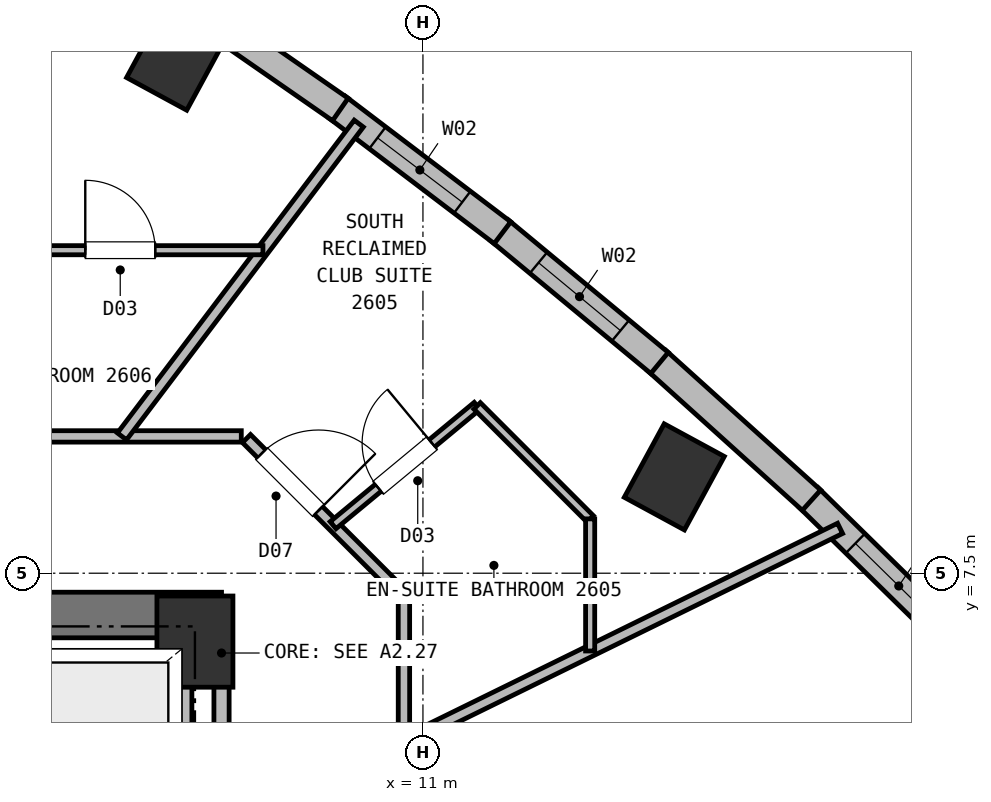
"""IFC4 building model, lengths in metres.
Left out: names, types, materials, properties, quantities, classifications, styles, units other than length and angle.
Written with IfcOpenShell. Run it as: python <this file> out.ifc"""

import sys

from ifc_helpers import new_model, si_unit, direction, frame, frame_2d, origin, origin_2d, place, context, subcontext, project, spatial, rectangle, extrude, element, fill, save


model = new_model("IFC4")
c1 = context("Model", 3, precision=1e-05, world=origin(), true_north=direction((0.0, 1.0)))
c2 = subcontext(c1, "Body", "Model", "MODEL_VIEW")
j1 = project(units=[si_unit("LENGTHUNIT", "METRE"), si_unit("PLANEANGLEUNIT", "RADIAN")], contexts=[c1])
p1 = place(None, origin())
s1 = spatial("IfcSite", under=j1, at=p1, CompositionType="ELEMENT")
p2 = place(p1, origin())
s2 = spatial("IfcBuilding", under=s1, at=p2, CompositionType="ELEMENT")
p3 = place(p2, frame((0.0, 0.0, 97.25)))
s3 = spatial("IfcBuildingStorey", under=s2, at=p3, CompositionType="ELEMENT", Elevation=97.25)
p4 = place(p3, frame((8.0, 6.6, 0.0), z_axis=(0.0, 0.0, 1.0), x_axis=(1.0, 0.0, 0.0)))
e1 = element("IfcColumn", 1, at=p4, inside=s3, PredefinedType="COLUMN", context=c2, shape_type="SweptSolid", body=[
    extrude(rectangle(XDim=1.0, YDim=1.2, at=origin_2d()), origin(), (0.0, 0.0, 1.0), 3.75),
])
p5 = place(p3, frame((-8.35, 6.95, 0.0), z_axis=(0.0, 0.0, 1.0), x_axis=(1.0, 0.0, 0.0)))
e2 = element("IfcWall", 2, at=p5, inside=s3, PredefinedType="SHEAR", context=c2, shape_type="SweptSolid", body=[
    extrude(rectangle(XDim=16.7, YDim=0.6, at=frame_2d((8.35, 0.0))), origin(), (0.0, 0.0, 1.0), 3.5),
])
for number, where, z_axis, x_axis in (
    (3, (14.307, 8.767, 0.0), (0.0, 0.0, 1.0), (-0.879, 0.477, 0.0)),
    (4, (7.759, 14.29, 0.0), (0.0, 0.0, 1.0), (-0.879, 0.477, 0.0)),
):
    element("IfcColumn", number, at=place(p3, frame(where, z_axis=z_axis, x_axis=x_axis)), inside=s3, PredefinedType="COLUMN", context=c2, shape_type="SweptSolid", body=[
        extrude(rectangle(XDim=0.9, YDim=1.1, at=origin_2d()), origin(), (0.0, 0.0, 1.0), 3.75),
    ])
p6 = place(p3, frame((16.075, 8.495, 0.0), z_axis=(0.0, 0.0, 1.0), x_axis=(0.713713584755, -0.70043766242, 0.0)))
e5 = element("IfcWall", 5, at=p6, inside=s3, PredefinedType="SOLIDWALL", context=c2, shape_type="SweptSolid", body=[
    extrude(rectangle(XDim=2.759, YDim=0.36, at=frame_2d((1.379, 0.0))), origin(), (0.0, 0.0, 1.0), 3.5),
])
p7 = place(p6, frame((0.86, 0.0, 0.72)))
e6 = element("IfcOpeningElement", 6, at=p7, cuts=e5, PredefinedType="OPENING", context=c2, shape_type="SweptSolid", body=[
    extrude(rectangle(XDim=1.6, YDim=1.88, at=frame_2d((0.8, 0.94))), frame((0.0, 0.19, 0.0), z_axis=(0.0, -1.0, 0.0), x_axis=(1.0, 0.0, 0.0)), (0.0, 0.0, 1.0), 0.38),
])
p8 = place(p3, frame((14.075, 10.299, 0.0), z_axis=(0.0, 0.0, 1.0), x_axis=(0.742346706701, -0.67001594537, 0.0)))
e7 = element("IfcWall", 7, at=p8, inside=s3, PredefinedType="SOLIDWALL", context=c2, shape_type="SweptSolid", body=[
    extrude(rectangle(XDim=2.744, YDim=0.36, at=frame_2d((1.372, 0.0))), origin(), (0.0, 0.0, 1.0), 3.5),
])
p9 = place(p3, frame((12.007, 12.011, 0.0), z_axis=(0.0, 0.0, 1.0), x_axis=(0.769960149578, -0.63809197461, 0.0)))
e8 = element("IfcWall", 8, at=p9, inside=s3, PredefinedType="SOLIDWALL", context=c2, shape_type="SweptSolid", body=[
    extrude(rectangle(XDim=2.735, YDim=0.36, at=frame_2d((1.367, 0.0))), origin(), (0.0, 0.0, 1.0), 3.5),
])
p10 = place(p9, frame((0.667, 0.0, 0.72)))
e9 = element("IfcOpeningElement", 9, at=p10, cuts=e8, PredefinedType="OPENING", context=c2, shape_type="SweptSolid", body=[
    extrude(rectangle(XDim=1.4, YDim=1.84, at=frame_2d((0.7, 0.92))), frame((0.0, 0.19, 0.0), z_axis=(0.0, -1.0, 0.0), x_axis=(1.0, 0.0, 0.0)), (0.0, 0.0, 1.0), 0.38),
])
p11 = place(p3, frame((9.873, 13.631, 0.0), z_axis=(0.0, 0.0, 1.0), x_axis=(0.796336225349, -0.604854210696, 0.0)))
e10 = element("IfcWall", 10, at=p11, inside=s3, PredefinedType="SOLIDWALL", context=c2, shape_type="SweptSolid", body=[
    extrude(rectangle(XDim=2.73, YDim=0.36, at=frame_2d((1.365, 0.0))), origin(), (0.0, 0.0, 1.0), 3.5),
])
p12 = place(p11, frame((0.665, 0.0, 0.72)))
e11 = element("IfcOpeningElement", 11, at=p12, cuts=e10, PredefinedType="OPENING", context=c2, shape_type="SweptSolid", body=[
    extrude(rectangle(XDim=1.4, YDim=1.84, at=frame_2d((0.7, 0.92))), frame((0.0, 0.19, 0.0), z_axis=(0.0, -1.0, 0.0), x_axis=(1.0, 0.0, 0.0)), (0.0, 0.0, 1.0), 0.38),
])
p13 = place(p3, frame((7.671, 15.159, 0.0), z_axis=(0.0, 0.0, 1.0), x_axis=(0.821331552378, -0.570451120665, 0.0)))
e12 = element("IfcWall", 12, at=p13, inside=s3, PredefinedType="SOLIDWALL", context=c2, shape_type="SweptSolid", body=[
    extrude(rectangle(XDim=2.73, YDim=0.36, at=frame_2d((1.365, 0.0))), origin(), (0.0, 0.0, 1.0), 3.5),
])
p14 = place(p3, frame((7.85, 4.57, 0.0), z_axis=(0.0, 0.0, 1.0), x_axis=(0.0, 1.0, 0.0)))
e13 = element("IfcWall", 13, at=p14, inside=s3, PredefinedType="PARTITIONING", context=c2, shape_type="SweptSolid", body=[
    extrude(rectangle(XDim=2.08, YDim=0.22, at=frame_2d((1.04, 0.0))), origin(), (0.0, 0.0, 1.0), 3.12),
])
p15 = place(p3, frame((8.35, 1.25, 0.0), z_axis=(0.0, 0.0, 1.0), x_axis=(0.0, 1.0, 0.0)))
e14 = element("IfcWall", 14, at=p15, inside=s3, PredefinedType="PARTITIONING", context=c2, shape_type="SweptSolid", body=[
    extrude(rectangle(XDim=5.3, YDim=0.2, at=frame_2d((2.65, 0.0))), origin(), (0.0, 0.0, 1.0), 3.5),
])
p16 = place(p15, frame((0.95, 0.0, 0.0)))
e15 = element("IfcOpeningElement", 15, at=p16, cuts=e14, PredefinedType="OPENING", context=c2, shape_type="SweptSolid", body=[
    extrude(rectangle(XDim=1.15, YDim=2.15, at=frame_2d((0.575, 1.075))), frame((0.0, 0.11, 0.0), z_axis=(0.0, -1.0, 0.0), x_axis=(1.0, 0.0, 0.0)), (0.0, 0.0, 1.0), 0.22),
])
p17 = place(p3, frame((10.75, 7.16, 0.0), z_axis=(0.0, 0.0, 1.0), x_axis=(0.0, -1.0, 0.0)))
e16 = element("IfcWall", 16, at=p17, inside=s3, PredefinedType="PARTITIONING", context=c2, shape_type="SweptSolid", body=[
    extrude(rectangle(XDim=12.92, YDim=0.15, at=frame_2d((6.46, 0.0))), origin(), (0.0, 0.0, 1.0), 3.5),
])
p18 = place(p17, frame((2.937, 0.0, 0.0)))
e17 = element("IfcOpeningElement", 17, at=p18, cuts=e16, PredefinedType="OPENING", context=c2, shape_type="SweptSolid", body=[
    extrude(rectangle(XDim=1.0, YDim=2.15, at=frame_2d((0.5, 1.075))), frame((0.0, 0.085, 0.0), z_axis=(0.0, -1.0, 0.0), x_axis=(1.0, 0.0, 0.0)), (0.0, 0.0, 1.0), 0.17),
])
p19 = place(p17, frame((8.03, 0.0, 0.0)))
e18 = element("IfcOpeningElement", 18, at=p19, cuts=e16, PredefinedType="OPENING", context=c2, shape_type="SweptSolid", body=[
    extrude(rectangle(XDim=1.06, YDim=2.15, at=frame_2d((0.53, 1.075))), frame((0.0, 0.085, 0.0), z_axis=(0.0, -1.0, 0.0), x_axis=(1.0, 0.0, 0.0)), (0.0, 0.0, 1.0), 0.17),
])
p20 = place(p3, frame((8.678, 9.272, 0.0), z_axis=(0.0, 0.0, 1.0), x_axis=(0.707106781187, -0.707106781187, 0.0)))
e19 = element("IfcWall", 19, at=p20, inside=s3, PredefinedType="PARTITIONING", context=c2, shape_type="SweptSolid", body=[
    extrude(rectangle(XDim=2.89, YDim=0.15, at=frame_2d((1.445, 0.0))), origin(), (0.0, 0.0, 1.0), 3.5),
])
p21 = place(p20, frame((0.28, 0.0, 0.0)))
e20 = element("IfcOpeningElement", 20, at=p21, cuts=e19, PredefinedType="OPENING", context=c2, shape_type="SweptSolid", body=[
    extrude(rectangle(XDim=1.06, YDim=2.15, at=frame_2d((0.53, 1.075))), frame((0.0, 0.085, 0.0), z_axis=(0.0, -1.0, 0.0), x_axis=(1.0, 0.0, 0.0)), (0.0, 0.0, 1.0), 0.17),
])
p22 = place(p3, frame((-8.61, 9.3, 0.0), z_axis=(0.0, 0.0, 1.0), x_axis=(1.0, 0.0, 0.0)))
e21 = element("IfcWall", 21, at=p22, inside=s3, PredefinedType="PARTITIONING", context=c2, shape_type="SweptSolid", body=[
    extrude(rectangle(XDim=17.22, YDim=0.15, at=frame_2d((8.61, 0.0))), origin(), (0.0, 0.0, 1.0), 3.5),
])
p23 = place(p22, frame((11.167, 0.0, 0.0)))
e22 = element("IfcOpeningElement", 22, at=p23, cuts=e21, PredefinedType="OPENING", context=c2, shape_type="SweptSolid", body=[
    extrude(rectangle(XDim=1.0, YDim=2.15, at=frame_2d((0.5, 1.075))), frame((0.0, 0.085, 0.0), z_axis=(0.0, -1.0, 0.0), x_axis=(1.0, 0.0, 0.0)), (0.0, 0.0, 1.0), 0.17),
])
p24 = place(p22, frame((6.944, 0.0, 0.0)))
e23 = element("IfcOpeningElement", 23, at=p24, cuts=e21, PredefinedType="OPENING", context=c2, shape_type="SweptSolid", body=[
    extrude(rectangle(XDim=1.06, YDim=2.15, at=frame_2d((0.53, 1.075))), frame((0.0, 0.085, 0.0), z_axis=(0.0, -1.0, 0.0), x_axis=(1.0, 0.0, 0.0)), (0.0, 0.0, 1.0), 0.17),
])
p25 = place(p22, frame((2.311, 0.0, 0.0)))
e24 = element("IfcOpeningElement", 24, at=p25, cuts=e21, PredefinedType="OPENING", context=c2, shape_type="SweptSolid", body=[
    extrude(rectangle(XDim=1.06, YDim=2.15, at=frame_2d((0.53, 1.075))), frame((0.0, 0.085, 0.0), z_axis=(0.0, -1.0, 0.0), x_axis=(1.0, 0.0, 0.0)), (0.0, 0.0, 1.0), 0.17),
])
p26 = place(p3, frame((10.75, 5.274, 0.0), z_axis=(0.0, 0.0, 1.0), x_axis=(0.897755780575, 0.440493539616, 0.0)))
e25 = element("IfcWall", 25, at=p26, inside=s3, PredefinedType="PARTITIONING", context=c2, shape_type="SweptSolid", body=[
    extrude(rectangle(XDim=6.392, YDim=0.15, at=frame_2d((3.196, 0.0))), origin(), (0.0, 0.0, 1.0), 3.5),
])
p27 = place(p3, frame((9.818, 8.132, 0.0), z_axis=(0.0, 0.0, 1.0), x_axis=(0.770088402747, 0.63793718496, 0.0)))
e26 = element("IfcWall", 26, at=p27, inside=s3, PredefinedType="PARTITIONING", context=c2, shape_type="SweptSolid", body=[
    extrude(rectangle(XDim=2.461, YDim=0.12, at=frame_2d((1.23, 0.0))), origin(), (0.0, 0.0, 1.0), 3.5),
])
p28 = place(p27, frame((0.771, 0.0, 0.0)))
e27 = element("IfcOpeningElement", 27, at=p28, cuts=e26, PredefinedType="OPENING", context=c2, shape_type="SweptSolid", body=[
    extrude(rectangle(XDim=0.92, YDim=2.1, at=frame_2d((0.46, 1.05))), frame((0.0, 0.07, 0.0), z_axis=(0.0, -1.0, 0.0), x_axis=(1.0, 0.0, 0.0)), (0.0, 0.0, 1.0), 0.14),
])
p29 = place(p3, frame((11.713, 9.702, 0.0), z_axis=(0.0, 0.0, 1.0), x_axis=(0.707106781187, -0.707106781187, 0.0)))
e28 = element("IfcWall", 28, at=p29, inside=s3, PredefinedType="PARTITIONING", context=c2, shape_type="SweptSolid", body=[
    extrude(rectangle(XDim=2.103, YDim=0.12, at=frame_2d((1.052, 0.0))), origin(), (0.0, 0.0, 1.0), 3.5),
])
p30 = place(p3, frame((13.2, 6.477, 0.0), z_axis=(0.0, 0.0, 1.0), x_axis=(0.0, 1.0, 0.0)))
e29 = element("IfcWall", 29, at=p30, inside=s3, PredefinedType="PARTITIONING", context=c2, shape_type="SweptSolid", body=[
    extrude(rectangle(XDim=1.738, YDim=0.12, at=frame_2d((0.869, 0.0))), origin(), (0.0, 0.0, 1.0), 3.5),
])
p31 = place(p3, frame((7.04, 9.3, 0.0), z_axis=(0.0, 0.0, 1.0), x_axis=(0.603580834167, 0.797301810249, 0.0)))
e30 = element("IfcWall", 30, at=p31, inside=s3, PredefinedType="PARTITIONING", context=c2, shape_type="SweptSolid", body=[
    extrude(rectangle(XDim=5.162, YDim=0.15, at=frame_2d((2.581, 0.0))), origin(), (0.0, 0.0, 1.0), 3.5),
])
p32 = place(p3, frame((5.14, 11.75, 0.0), z_axis=(0.0, 0.0, 1.0), x_axis=(1.0, 0.0, 0.0)))
e31 = element("IfcWall", 31, at=p32, inside=s3, PredefinedType="PARTITIONING", context=c2, shape_type="SweptSolid", body=[
    extrude(rectangle(XDim=3.755, YDim=0.12, at=frame_2d((1.877, 0.0))), origin(), (0.0, 0.0, 1.0), 3.5),
])
p33 = place(p32, frame((1.417, 0.0, 0.0)))
e32 = element("IfcOpeningElement", 32, at=p33, cuts=e31, PredefinedType="OPENING", context=c2, shape_type="SweptSolid", body=[
    extrude(rectangle(XDim=0.92, YDim=2.1, at=frame_2d((0.46, 1.05))), frame((0.0, 0.07, 0.0), z_axis=(0.0, -1.0, 0.0), x_axis=(1.0, 0.0, 0.0)), (0.0, 0.0, 1.0), 0.14),
])
p34 = place(p7, origin())
e33 = element("IfcWindow", 33, at=p34, inside=s3, PartitioningType="SINGLE_PANEL", PredefinedType="WINDOW", context=c2, shape_type="SweptSolid", body=[
    extrude(rectangle(XDim=1.6, YDim=1.88, at=frame_2d((0.8, 0.94))), frame((0.0, 0.03, 0.0), z_axis=(0.0, -1.0, 0.0), x_axis=(1.0, 0.0, 0.0)), (0.0, 0.0, 1.0), 0.06),
])
fill(e6, e33)
p35 = place(p10, origin())
e34 = element("IfcWindow", 34, at=p35, inside=s3, PartitioningType="SINGLE_PANEL", PredefinedType="WINDOW", context=c2, shape_type="SweptSolid", body=[
    extrude(rectangle(XDim=1.4, YDim=1.84, at=frame_2d((0.7, 0.92))), frame((0.0, 0.03, 0.0), z_axis=(0.0, -1.0, 0.0), x_axis=(1.0, 0.0, 0.0)), (0.0, 0.0, 1.0), 0.06),
])
fill(e9, e34)
p36 = place(p12, origin())
e35 = element("IfcWindow", 35, at=p36, inside=s3, PartitioningType="SINGLE_PANEL", PredefinedType="WINDOW", context=c2, shape_type="SweptSolid", body=[
    extrude(rectangle(XDim=1.4, YDim=1.84, at=frame_2d((0.7, 0.92))), frame((0.0, 0.03, 0.0), z_axis=(0.0, -1.0, 0.0), x_axis=(1.0, 0.0, 0.0)), (0.0, 0.0, 1.0), 0.06),
])
fill(e11, e35)
p37 = place(p28, origin())
e36 = element("IfcDoor", 36, at=p37, inside=s3, OperationType="SINGLE_SWING_RIGHT", PredefinedType="DOOR", context=c2, shape_type="SweptSolid", body=[
    extrude(rectangle(XDim=0.92, YDim=2.1, at=frame_2d((0.46, 1.05))), frame((0.0, 0.025, 0.0), z_axis=(0.0, -1.0, 0.0), x_axis=(1.0, 0.0, 0.0)), (0.0, 0.0, 1.0), 0.05),
])
fill(e27, e36)
p38 = place(p33, origin())
e37 = element("IfcDoor", 37, at=p38, inside=s3, OperationType="SINGLE_SWING_LEFT", PredefinedType="DOOR", context=c2, shape_type="SweptSolid", body=[
    extrude(rectangle(XDim=0.92, YDim=2.1, at=frame_2d((0.46, 1.05))), frame((0.0, 0.025, 0.0), z_axis=(0.0, -1.0, 0.0), x_axis=(1.0, 0.0, 0.0)), (0.0, 0.0, 1.0), 0.05),
])
fill(e32, e37)
p39 = place(p21, origin())
e38 = element("IfcDoor", 38, at=p39, inside=s3, OperationType="SINGLE_SWING_RIGHT", PredefinedType="DOOR", context=c2, shape_type="SweptSolid", body=[
    extrude(rectangle(XDim=1.06, YDim=2.15, at=frame_2d((0.53, 1.075))), frame((0.0, 0.025, 0.0), z_axis=(0.0, -1.0, 0.0), x_axis=(1.0, 0.0, 0.0)), (0.0, 0.0, 1.0), 0.05),
])
fill(e20, e38)
save(model, sys.argv[1])
